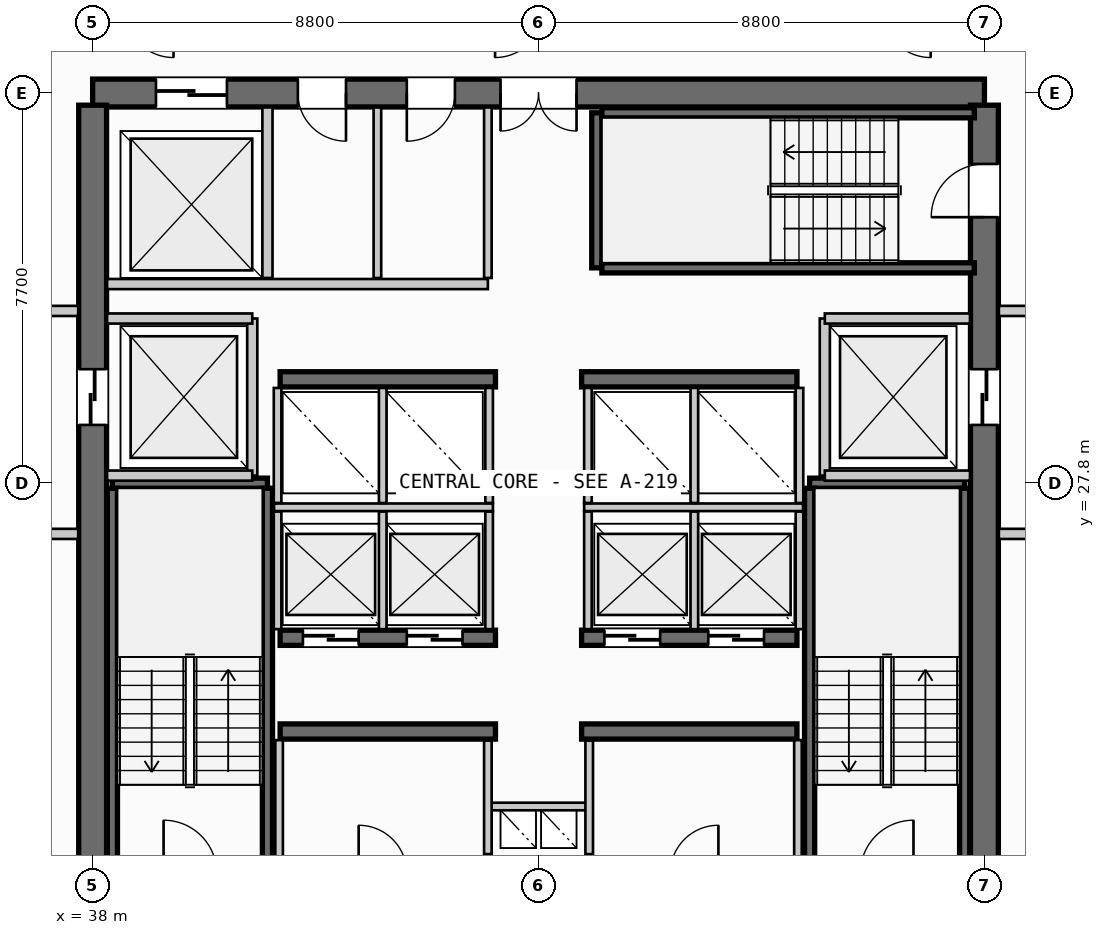
"""IFC4 building model, lengths in metres.
Left out: names, types, materials, properties, quantities, classifications, styles, units other than length and angle.
Written with IfcOpenShell. Run it as: python <this file> out.ifc"""

import sys

from ifc_helpers import new_model, si_unit, direction, frame, frame_2d, origin, place, context, subcontext, project, spatial, rectangle, extrude, source, transform, mapped, element, fill, save


model = new_model("IFC4")
c1 = context("Model", 3, precision=1e-05, world=origin(), true_north=direction((0.0, 1.0)))
c2 = subcontext(c1, "Body", "Model", "MODEL_VIEW")
j1 = project(units=[si_unit("LENGTHUNIT", "METRE"), si_unit("PLANEANGLEUNIT", "RADIAN")], contexts=[c1])
p1 = place(None, origin())
s1 = spatial("IfcSite", under=j1, at=p1, CompositionType="ELEMENT")
p2 = place(p1, origin())
s2 = spatial("IfcBuilding", under=s1, at=p2, CompositionType="ELEMENT")
p3 = place(p2, frame((0.0, 0.0, 135.9)))
s3 = spatial("IfcBuildingStorey", under=s2, at=p3, CompositionType="ELEMENT", Elevation=135.9)
p4 = place(p3, frame((55.6, 35.5, 0.0), z_axis=(0.0, 0.0, 1.0), x_axis=(-1.0, 0.0, 0.0)))
e1 = element("IfcWall", 1, at=p4, inside=s3, PredefinedType="SHEAR", context=c2, shape_type="SweptSolid", body=[
    extrude(rectangle(XDim=17.6, YDim=0.55, at=frame_2d((8.8, 0.0))), origin(), (0.0, 0.0, 1.0), 3.3),
])
p5 = place(p4, frame((8.05, 0.0, 0.0)))
e2 = element("IfcOpeningElement", 2, at=p5, cuts=e1, PredefinedType="OPENING", context=c2, shape_type="SweptSolid", body=[
    extrude(rectangle(XDim=1.5, YDim=2.2, at=frame_2d((0.75, 1.1))), frame((0.0, 0.285, 0.0), z_axis=(0.0, -1.0, 0.0), x_axis=(1.0, 0.0, 0.0)), (0.0, 0.0, 1.0), 0.57),
])
p6 = place(p4, frame((14.95, 0.0, 0.0)))
e3 = element("IfcOpeningElement", 3, at=p6, cuts=e1, PredefinedType="OPENING", context=c2, shape_type="SweptSolid", body=[
    extrude(rectangle(XDim=1.4, YDim=2.3, at=frame_2d((0.7, 1.15))), frame((0.0, 0.285, 0.0), z_axis=(0.0, -1.0, 0.0), x_axis=(1.0, 0.0, 0.0)), (0.0, 0.0, 1.0), 0.57),
])
p7 = place(p4, frame((12.6, 0.0, 0.0)))
e4 = element("IfcOpeningElement", 4, at=p7, cuts=e1, PredefinedType="OPENING", context=c2, shape_type="SweptSolid", body=[
    extrude(rectangle(XDim=0.95, YDim=2.15, at=frame_2d((0.475, 1.075))), frame((0.0, 0.285, 0.0), z_axis=(0.0, -1.0, 0.0), x_axis=(1.0, 0.0, 0.0)), (0.0, 0.0, 1.0), 0.57),
])
p8 = place(p4, frame((10.45, 0.0, 0.0)))
e5 = element("IfcOpeningElement", 5, at=p8, cuts=e1, PredefinedType="OPENING", context=c2, shape_type="SweptSolid", body=[
    extrude(rectangle(XDim=0.95, YDim=2.15, at=frame_2d((0.475, 1.075))), frame((0.0, 0.285, 0.0), z_axis=(0.0, -1.0, 0.0), x_axis=(1.0, 0.0, 0.0)), (0.0, 0.0, 1.0), 0.57),
])
p9 = place(p3, frame((38.0, 35.26, 0.0), z_axis=(0.0, 0.0, 1.0), x_axis=(0.0, -1.0, 0.0)))
e6 = element("IfcWall", 6, at=p9, inside=s3, PredefinedType="SHEAR", context=c2, shape_type="SweptSolid", body=[
    extrude(rectangle(XDim=14.92, YDim=0.55, at=frame_2d((7.46, 0.0))), origin(), (0.0, 0.0, 1.0), 3.3),
])
p10 = place(p9, frame((5.21, 0.0, 0.0)))
e7 = element("IfcOpeningElement", 7, at=p10, cuts=e6, PredefinedType="OPENING", context=c2, shape_type="SweptSolid", body=[
    extrude(rectangle(XDim=1.1, YDim=2.2, at=frame_2d((0.55, 1.1))), frame((0.0, 0.285, 0.0), z_axis=(0.0, -1.0, 0.0), x_axis=(1.0, 0.0, 0.0)), (0.0, 0.0, 1.0), 0.57),
])
p11 = place(p3, frame((55.6, 20.34, 0.0), z_axis=(0.0, 0.0, 1.0), x_axis=(0.0, 1.0, 0.0)))
e8 = element("IfcWall", 8, at=p11, inside=s3, PredefinedType="SHEAR", context=c2, shape_type="SweptSolid", body=[
    extrude(rectangle(XDim=14.92, YDim=0.55, at=frame_2d((7.46, 0.0))), origin(), (0.0, 0.0, 1.0), 3.3),
])
p12 = place(p11, frame((12.71, 0.0, 0.0)))
e9 = element("IfcOpeningElement", 9, at=p12, cuts=e8, PredefinedType="OPENING", context=c2, shape_type="SweptSolid", body=[
    extrude(rectangle(XDim=1.05, YDim=2.15, at=frame_2d((0.525, 1.075))), frame((0.0, 0.285, 0.0), z_axis=(0.0, -1.0, 0.0), x_axis=(1.0, 0.0, 0.0)), (0.0, 0.0, 1.0), 0.57),
])
p13 = place(p11, frame((8.61, 0.0, 0.0)))
e10 = element("IfcOpeningElement", 10, at=p13, cuts=e8, PredefinedType="OPENING", context=c2, shape_type="SweptSolid", body=[
    extrude(rectangle(XDim=1.1, YDim=2.2, at=frame_2d((0.55, 1.1))), frame((0.0, 0.285, 0.0), z_axis=(0.0, -1.0, 0.0), x_axis=(1.0, 0.0, 0.0)), (0.0, 0.0, 1.0), 0.57),
])
for number, where, z_axis, x_axis in (
    (11, (41.7, 22.9, 0.0), (0.0, 0.0, 1.0), (1.0, 0.0, 0.0)),
    (12, (47.65, 22.9, 0.0), (0.0, 0.0, 1.0), (1.0, 0.0, 0.0)),
):
    element("IfcWall", number, at=place(p3, frame(where, z_axis=z_axis, x_axis=x_axis)), inside=s3, PredefinedType="SHEAR", context=c2, shape_type="SweptSolid", body=[
        extrude(rectangle(XDim=4.25, YDim=0.3, at=frame_2d((2.125, 0.0))), origin(), (0.0, 0.0, 1.0), 3.3),
    ])
p14 = place(p3, frame((41.7, 24.75, 0.0), z_axis=(0.0, 0.0, 1.0), x_axis=(1.0, 0.0, 0.0)))
e13 = element("IfcWall", 13, at=p14, inside=s3, PredefinedType="SHEAR", context=c2, shape_type="SweptSolid", body=[
    extrude(rectangle(XDim=4.25, YDim=0.3, at=frame_2d((2.125, 0.0))), origin(), (0.0, 0.0, 1.0), 3.3),
])
p15 = place(p14, frame((0.45, 0.0, 0.0)))
e14 = element("IfcOpeningElement", 14, at=p15, cuts=e13, PredefinedType="OPENING", context=c2, shape_type="SweptSolid", body=[
    extrude(rectangle(XDim=1.1, YDim=2.2, at=frame_2d((0.55, 1.1))), frame((0.0, 0.16, 0.0), z_axis=(0.0, -1.0, 0.0), x_axis=(1.0, 0.0, 0.0)), (0.0, 0.0, 1.0), 0.32),
])
p16 = place(p14, frame((2.5, 0.0, 0.0)))
e15 = element("IfcOpeningElement", 15, at=p16, cuts=e13, PredefinedType="OPENING", context=c2, shape_type="SweptSolid", body=[
    extrude(rectangle(XDim=1.1, YDim=2.2, at=frame_2d((0.55, 1.1))), frame((0.0, 0.16, 0.0), z_axis=(0.0, -1.0, 0.0), x_axis=(1.0, 0.0, 0.0)), (0.0, 0.0, 1.0), 0.32),
])
p17 = place(p3, frame((47.65, 24.75, 0.0), z_axis=(0.0, 0.0, 1.0), x_axis=(1.0, 0.0, 0.0)))
e16 = element("IfcWall", 16, at=p17, inside=s3, PredefinedType="SHEAR", context=c2, shape_type="SweptSolid", body=[
    extrude(rectangle(XDim=4.25, YDim=0.3, at=frame_2d((2.125, 0.0))), origin(), (0.0, 0.0, 1.0), 3.3),
])
p18 = place(p17, frame((0.45, 0.0, 0.0)))
e17 = element("IfcOpeningElement", 17, at=p18, cuts=e16, PredefinedType="OPENING", context=c2, shape_type="SweptSolid", body=[
    extrude(rectangle(XDim=1.1, YDim=2.2, at=frame_2d((0.55, 1.1))), frame((0.0, 0.16, 0.0), z_axis=(0.0, -1.0, 0.0), x_axis=(1.0, 0.0, 0.0)), (0.0, 0.0, 1.0), 0.32),
])
p19 = place(p17, frame((2.5, 0.0, 0.0)))
e18 = element("IfcOpeningElement", 18, at=p19, cuts=e16, PredefinedType="OPENING", context=c2, shape_type="SweptSolid", body=[
    extrude(rectangle(XDim=1.1, YDim=2.2, at=frame_2d((0.55, 1.1))), frame((0.0, 0.16, 0.0), z_axis=(0.0, -1.0, 0.0), x_axis=(1.0, 0.0, 0.0)), (0.0, 0.0, 1.0), 0.32),
])
for number, where, z_axis, x_axis in (
    (19, (41.7, 29.85, 0.0), (0.0, 0.0, 1.0), (1.0, 0.0, 0.0)),
    (20, (47.65, 29.85, 0.0), (0.0, 0.0, 1.0), (1.0, 0.0, 0.0)),
):
    element("IfcWall", number, at=place(p3, frame(where, z_axis=z_axis, x_axis=x_axis)), inside=s3, PredefinedType="SHEAR", context=c2, shape_type="SweptSolid", body=[
        extrude(rectangle(XDim=4.25, YDim=0.3, at=frame_2d((2.125, 0.0))), origin(), (0.0, 0.0, 1.0), 3.3),
    ])
p20 = place(p3, frame((38.39, 27.8, 0.0), z_axis=(0.0, 0.0, 1.0), x_axis=(1.0, 0.0, 0.0)))
e21 = element("IfcWall", 21, at=p20, inside=s3, PredefinedType="SHEAR", context=c2, shape_type="SweptSolid", body=[
    extrude(rectangle(XDim=3.06, YDim=0.2, at=frame_2d((1.53, 0.0))), origin(), (0.0, 0.0, 1.0), 3.3),
])
for number, where, z_axis, x_axis in (
    (22, (41.45, 27.7, 0.0), (0.0, 0.0, 1.0), (0.0, -1.0, 0.0)),
    (23, (38.39, 20.35, 0.0), (0.0, 0.0, 1.0), (0.0, 1.0, 0.0)),
):
    element("IfcWall", number, at=place(p3, frame(where, z_axis=z_axis, x_axis=x_axis)), inside=s3, PredefinedType="SHEAR", context=c2, shape_type="SweptSolid", body=[
        extrude(rectangle(XDim=7.35, YDim=0.2, at=frame_2d((3.675, 0.0))), origin(), (0.0, 0.0, 1.0), 3.3),
    ])
p21 = place(p3, frame((52.15, 27.8, 0.0), z_axis=(0.0, 0.0, 1.0), x_axis=(1.0, 0.0, 0.0)))
e24 = element("IfcWall", 24, at=p21, inside=s3, PredefinedType="SHEAR", context=c2, shape_type="SweptSolid", body=[
    extrude(rectangle(XDim=3.06, YDim=0.2, at=frame_2d((1.53, 0.0))), origin(), (0.0, 0.0, 1.0), 3.3),
])
for number, where, z_axis, x_axis in (
    (25, (55.21, 27.7, 0.0), (0.0, 0.0, 1.0), (0.0, -1.0, 0.0)),
    (26, (52.15, 20.35, 0.0), (0.0, 0.0, 1.0), (0.0, 1.0, 0.0)),
):
    element("IfcWall", number, at=place(p3, frame(where, z_axis=z_axis, x_axis=x_axis)), inside=s3, PredefinedType="SHEAR", context=c2, shape_type="SweptSolid", body=[
        extrude(rectangle(XDim=7.35, YDim=0.2, at=frame_2d((3.675, 0.0))), origin(), (0.0, 0.0, 1.0), 3.3),
    ])
p22 = place(p3, frame((47.95, 32.05, 0.0), z_axis=(0.0, 0.0, 1.0), x_axis=(0.0, 1.0, 0.0)))
e27 = element("IfcWall", 27, at=p22, inside=s3, PredefinedType="SHEAR", context=c2, shape_type="SweptSolid", body=[
    extrude(rectangle(XDim=3.06, YDim=0.2, at=frame_2d((1.53, 0.0))), origin(), (0.0, 0.0, 1.0), 3.3),
])
for number, where, z_axis, x_axis in (
    (28, (48.05, 35.11, 0.0), (0.0, 0.0, 1.0), (1.0, 0.0, 0.0)),
    (29, (55.4, 32.05, 0.0), (0.0, 0.0, 1.0), (-1.0, 0.0, 0.0)),
):
    element("IfcWall", number, at=place(p3, frame(where, z_axis=z_axis, x_axis=x_axis)), inside=s3, PredefinedType="SHEAR", context=c2, shape_type="SweptSolid", body=[
        extrude(rectangle(XDim=7.35, YDim=0.2, at=frame_2d((3.675, 0.0))), origin(), (0.0, 0.0, 1.0), 3.3),
    ])
p23 = place(p3, frame((45.8, 21.42, 0.0), z_axis=(0.0, 0.0, 1.0), x_axis=(1.0, 0.0, 0.0)))
e30 = element("IfcWall", 30, at=p23, inside=s3, PredefinedType="PARTITIONING", context=c2, shape_type="SweptSolid", body=[
    extrude(rectangle(XDim=2.0, YDim=0.15, at=frame_2d((1.0, 0.0))), origin(), (0.0, 0.0, 1.0), 2.445),
])
for number, where, z_axis, x_axis in (
    (31, (45.8, 20.48, 0.0), (0.0, 0.0, 1.0), (0.0, 1.0, 0.0)),
    (32, (47.8, 20.48, 0.0), (0.0, 0.0, 1.0), (0.0, 1.0, 0.0)),
):
    element("IfcWall", number, at=place(p3, frame(where, z_axis=z_axis, x_axis=x_axis)), inside=s3, PredefinedType="PARTITIONING", context=c2, shape_type="SweptSolid", body=[
        extrude(rectangle(XDim=2.24, YDim=0.15, at=frame_2d((1.12, 0.0))), origin(), (0.0, 0.0, 1.0), 2.445),
    ])
p24 = place(p3, frame((41.15, 27.95, 0.0), z_axis=(0.0, 0.0, 1.0), x_axis=(0.0, 1.0, 0.0)))
e33 = element("IfcWall", 33, at=p24, inside=s3, PredefinedType="PARTITIONING", context=c2, shape_type="SweptSolid", body=[
    extrude(rectangle(XDim=3.1, YDim=0.2, at=frame_2d((1.55, 0.0))), origin(), (0.0, 0.0, 1.0), 2.445),
])
for number, where, z_axis, x_axis in (
    (34, (38.285, 27.95, 0.0), (0.0, 0.0, 1.0), (1.0, 0.0, 0.0)),
    (35, (38.285, 31.05, 0.0), (0.0, 0.0, 1.0), (1.0, 0.0, 0.0)),
):
    element("IfcWall", number, at=place(p3, frame(where, z_axis=z_axis, x_axis=x_axis)), inside=s3, PredefinedType="PARTITIONING", context=c2, shape_type="SweptSolid", body=[
        extrude(rectangle(XDim=2.865, YDim=0.2, at=frame_2d((1.433, 0.0))), origin(), (0.0, 0.0, 1.0), 2.445),
    ])
for number, where, z_axis, x_axis in (
    (36, (34.5, 26.8, 0.0), (0.0, 0.0, 1.0), (1.0, 0.0, 0.0)),
    (37, (34.5, 31.2, 0.0), (0.0, 0.0, 1.0), (1.0, 0.0, 0.0)),
):
    element("IfcWall", number, at=place(p3, frame(where, z_axis=z_axis, x_axis=x_axis)), inside=s3, PredefinedType="PARTITIONING", context=c2, shape_type="SweptSolid", body=[
        extrude(rectangle(XDim=3.215, YDim=0.2, at=frame_2d((1.607, 0.0))), origin(), (0.0, 0.0, 1.0), 2.445),
    ])
p25 = place(p3, frame((52.45, 27.95, 0.0), z_axis=(0.0, 0.0, 1.0), x_axis=(0.0, 1.0, 0.0)))
e38 = element("IfcWall", 38, at=p25, inside=s3, PredefinedType="PARTITIONING", context=c2, shape_type="SweptSolid", body=[
    extrude(rectangle(XDim=3.1, YDim=0.2, at=frame_2d((1.55, 0.0))), origin(), (0.0, 0.0, 1.0), 2.445),
])
for number, where, z_axis, x_axis in (
    (39, (52.45, 27.95, 0.0), (0.0, 0.0, 1.0), (1.0, 0.0, 0.0)),
    (40, (52.45, 31.05, 0.0), (0.0, 0.0, 1.0), (1.0, 0.0, 0.0)),
):
    element("IfcWall", number, at=place(p3, frame(where, z_axis=z_axis, x_axis=x_axis)), inside=s3, PredefinedType="PARTITIONING", context=c2, shape_type="SweptSolid", body=[
        extrude(rectangle(XDim=2.865, YDim=0.2, at=frame_2d((1.433, 0.0))), origin(), (0.0, 0.0, 1.0), 2.445),
    ])
for number, where, z_axis, x_axis in (
    (41, (55.885, 26.8, 0.0), (0.0, 0.0, 1.0), (1.0, 0.0, 0.0)),
    (42, (55.885, 31.2, 0.0), (0.0, 0.0, 1.0), (1.0, 0.0, 0.0)),
):
    element("IfcWall", number, at=place(p3, frame(where, z_axis=z_axis, x_axis=x_axis)), inside=s3, PredefinedType="PARTITIONING", context=c2, shape_type="SweptSolid", body=[
        extrude(rectangle(XDim=3.215, YDim=0.2, at=frame_2d((1.607, 0.0))), origin(), (0.0, 0.0, 1.0), 2.445),
    ])
for number, where, z_axis, x_axis in (
    (43, (41.68, 20.385, 0.0), (0.0, 0.0, 1.0), (0.0, 1.0, 0.0)),
    (44, (51.92, 20.385, 0.0), (0.0, 0.0, 1.0), (0.0, 1.0, 0.0)),
):
    element("IfcWall", number, at=place(p3, frame(where, z_axis=z_axis, x_axis=x_axis)), inside=s3, PredefinedType="PARTITIONING", context=c2, shape_type="SweptSolid", body=[
        extrude(rectangle(XDim=2.345, YDim=0.15, at=frame_2d((1.172, 0.0))), origin(), (0.0, 0.0, 1.0), 2.445),
    ])
p26 = place(p3, frame((41.58, 27.325, 0.0), z_axis=(0.0, 0.0, 1.0), x_axis=(1.0, 0.0, 0.0)))
e45 = element("IfcWall", 45, at=p26, inside=s3, PredefinedType="PARTITIONING", context=c2, shape_type="SweptSolid", body=[
    extrude(rectangle(XDim=4.32, YDim=0.15, at=frame_2d((2.16, 0.0))), origin(), (0.0, 0.0, 1.0), 2.445),
])
p27 = place(p3, frame((47.7, 27.325, 0.0), z_axis=(0.0, 0.0, 1.0), x_axis=(1.0, 0.0, 0.0)))
e46 = element("IfcWall", 46, at=p27, inside=s3, PredefinedType="PARTITIONING", context=c2, shape_type="SweptSolid", body=[
    extrude(rectangle(XDim=4.32, YDim=0.15, at=frame_2d((2.16, 0.0))), origin(), (0.0, 0.0, 1.0), 2.445),
])
for number, where, z_axis, x_axis in (
    (47, (41.65, 24.92, 0.0), (0.0, 0.0, 1.0), (0.0, 1.0, 0.0)),
    (48, (43.725, 24.92, 0.0), (0.0, 0.0, 1.0), (0.0, 1.0, 0.0)),
    (49, (45.825, 24.92, 0.0), (0.0, 0.0, 1.0), (0.0, 1.0, 0.0)),
    (50, (47.775, 24.92, 0.0), (0.0, 0.0, 1.0), (0.0, 1.0, 0.0)),
    (51, (49.875, 24.92, 0.0), (0.0, 0.0, 1.0), (0.0, 1.0, 0.0)),
    (52, (51.95, 24.92, 0.0), (0.0, 0.0, 1.0), (0.0, 1.0, 0.0)),
):
    element("IfcWall", number, at=place(p3, frame(where, z_axis=z_axis, x_axis=x_axis)), inside=s3, PredefinedType="PARTITIONING", context=c2, shape_type="SweptSolid", body=[
        extrude(rectangle(XDim=2.32, YDim=0.15, at=frame_2d((1.16, 0.0))), origin(), (0.0, 0.0, 1.0), 2.445),
    ])
for number, where, z_axis, x_axis in (
    (53, (41.65, 27.41, 0.0), (0.0, 0.0, 1.0), (0.0, 1.0, 0.0)),
    (54, (43.725, 27.41, 0.0), (0.0, 0.0, 1.0), (0.0, 1.0, 0.0)),
    (55, (45.825, 27.41, 0.0), (0.0, 0.0, 1.0), (0.0, 1.0, 0.0)),
    (56, (47.775, 27.41, 0.0), (0.0, 0.0, 1.0), (0.0, 1.0, 0.0)),
    (57, (49.875, 27.41, 0.0), (0.0, 0.0, 1.0), (0.0, 1.0, 0.0)),
    (58, (51.95, 27.41, 0.0), (0.0, 0.0, 1.0), (0.0, 1.0, 0.0)),
):
    element("IfcWall", number, at=place(p3, frame(where, z_axis=z_axis, x_axis=x_axis)), inside=s3, PredefinedType="PARTITIONING", context=c2, shape_type="SweptSolid", body=[
        extrude(rectangle(XDim=2.27, YDim=0.15, at=frame_2d((1.135, 0.0))), origin(), (0.0, 0.0, 1.0), 2.445),
    ])
p28 = place(p3, frame((41.45, 31.85, 0.0), z_axis=(0.0, 0.0, 1.0), x_axis=(0.0, 1.0, 0.0)))
e59 = element("IfcWall", 59, at=p28, inside=s3, PredefinedType="PARTITIONING", context=c2, shape_type="SweptSolid", body=[
    extrude(rectangle(XDim=3.365, YDim=0.2, at=frame_2d((1.683, 0.0))), origin(), (0.0, 0.0, 1.0), 2.445),
])
p29 = place(p3, frame((38.285, 31.73, 0.0), z_axis=(0.0, 0.0, 1.0), x_axis=(1.0, 0.0, 0.0)))
e60 = element("IfcWall", 60, at=p29, inside=s3, PredefinedType="PARTITIONING", context=c2, shape_type="SweptSolid", body=[
    extrude(rectangle(XDim=7.515, YDim=0.2, at=frame_2d((3.758, 0.0))), origin(), (0.0, 0.0, 1.0), 2.445),
])
p30 = place(p3, frame((45.8, 31.85, 0.0), z_axis=(0.0, 0.0, 1.0), x_axis=(0.0, 1.0, 0.0)))
e61 = element("IfcWall", 61, at=p30, inside=s3, PredefinedType="PARTITIONING", context=c2, shape_type="SweptSolid", body=[
    extrude(rectangle(XDim=3.365, YDim=0.15, at=frame_2d((1.683, 0.0))), origin(), (0.0, 0.0, 1.0), 2.445),
])
p31 = place(p3, frame((43.62, 31.85, 0.0), z_axis=(0.0, 0.0, 1.0), x_axis=(0.0, 1.0, 0.0)))
e62 = element("IfcWall", 62, at=p31, inside=s3, PredefinedType="PLUMBINGWALL", context=c2, shape_type="SweptSolid", body=[
    extrude(rectangle(XDim=3.365, YDim=0.15, at=frame_2d((1.683, 0.0))), origin(), (0.0, 0.0, 1.0), 2.445),
])
m1 = source(origin(), c2, "Body", "SweptSolid", [
    extrude(rectangle(XDim=1.05, YDim=2.15, at=frame_2d((0.525, 1.075))), frame((0.0, 0.025, 0.0), z_axis=(0.0, -1.0, 0.0), x_axis=(1.0, 0.0, 0.0)), (0.0, 0.0, 1.0), 0.05),
])
p32 = place(p12, origin())
e63 = element("IfcDoor", 63, at=p32, inside=s3, OperationType="SINGLE_SWING_LEFT", PredefinedType="DOOR", context=c2, shape_type="MappedRepresentation", body=[
    mapped(m1, transform((0.0, 0.0, 0.0), scale=1.0)),
])
fill(e9, e63)
m2 = source(origin(), c2, "Body", "SweptSolid", [
    extrude(rectangle(XDim=1.5, YDim=2.2, at=frame_2d((0.75, 1.1))), frame((0.0, 0.025, 0.0), z_axis=(0.0, -1.0, 0.0), x_axis=(1.0, 0.0, 0.0)), (0.0, 0.0, 1.0), 0.05),
])
p33 = place(p5, origin())
e64 = element("IfcDoor", 64, at=p33, inside=s3, OperationType="DOUBLE_DOOR_SINGLE_SWING", PredefinedType="DOOR", context=c2, shape_type="MappedRepresentation", body=[
    mapped(m2, transform((0.0, 0.0, 0.0), scale=1.0)),
])
fill(e2, e64)
m3 = source(origin(), c2, "Body", "SweptSolid", [
    extrude(rectangle(XDim=1.1, YDim=2.2, at=frame_2d((0.55, 1.1))), frame((0.0, 0.025, 0.0), z_axis=(0.0, -1.0, 0.0), x_axis=(1.0, 0.0, 0.0)), (0.0, 0.0, 1.0), 0.05),
])
p34 = place(p10, origin())
e65 = element("IfcDoor", 65, at=p34, inside=s3, OperationType="SLIDING_TO_LEFT", PredefinedType="DOOR", context=c2, shape_type="MappedRepresentation", body=[
    mapped(m3, transform((0.0, 0.0, 0.0), scale=1.0)),
])
fill(e7, e65)
p35 = place(p13, origin())
e66 = element("IfcDoor", 66, at=p35, inside=s3, OperationType="SLIDING_TO_RIGHT", PredefinedType="DOOR", context=c2, shape_type="MappedRepresentation", body=[
    mapped(m3, transform((0.0, 0.0, 0.0), scale=1.0)),
])
fill(e10, e66)
p36 = place(p15, origin())
e67 = element("IfcDoor", 67, at=p36, inside=s3, OperationType="SLIDING_TO_RIGHT", PredefinedType="DOOR", context=c2, shape_type="MappedRepresentation", body=[
    mapped(m3, transform((0.0, 0.0, 0.0), scale=1.0)),
])
fill(e14, e67)
p37 = place(p16, origin())
e68 = element("IfcDoor", 68, at=p37, inside=s3, OperationType="SLIDING_TO_RIGHT", PredefinedType="DOOR", context=c2, shape_type="MappedRepresentation", body=[
    mapped(m3, transform((0.0, 0.0, 0.0), scale=1.0)),
])
fill(e15, e68)
p38 = place(p18, origin())
e69 = element("IfcDoor", 69, at=p38, inside=s3, OperationType="SLIDING_TO_RIGHT", PredefinedType="DOOR", context=c2, shape_type="MappedRepresentation", body=[
    mapped(m3, transform((0.0, 0.0, 0.0), scale=1.0)),
])
fill(e17, e69)
p39 = place(p19, origin())
e70 = element("IfcDoor", 70, at=p39, inside=s3, OperationType="SLIDING_TO_RIGHT", PredefinedType="DOOR", context=c2, shape_type="MappedRepresentation", body=[
    mapped(m3, transform((0.0, 0.0, 0.0), scale=1.0)),
])
fill(e18, e70)
m4 = source(origin(), c2, "Body", "SweptSolid", [
    extrude(rectangle(XDim=1.4, YDim=2.3, at=frame_2d((0.7, 1.15))), frame((0.0, 0.025, 0.0), z_axis=(0.0, -1.0, 0.0), x_axis=(1.0, 0.0, 0.0)), (0.0, 0.0, 1.0), 0.05),
])
p40 = place(p6, origin())
e71 = element("IfcDoor", 71, at=p40, inside=s3, OperationType="SLIDING_TO_RIGHT", PredefinedType="DOOR", context=c2, shape_type="MappedRepresentation", body=[
    mapped(m4, transform((0.0, 0.0, 0.0), scale=1.0)),
])
fill(e3, e71)
m5 = source(origin(), c2, "Body", "SweptSolid", [
    extrude(rectangle(XDim=0.95, YDim=2.15, at=frame_2d((0.475, 1.075))), frame((0.0, 0.025, 0.0), z_axis=(0.0, -1.0, 0.0), x_axis=(1.0, 0.0, 0.0)), (0.0, 0.0, 1.0), 0.05),
])
p41 = place(p7, origin())
e72 = element("IfcDoor", 72, at=p41, inside=s3, OperationType="SINGLE_SWING_LEFT", PredefinedType="DOOR", context=c2, shape_type="MappedRepresentation", body=[
    mapped(m5, transform((0.0, 0.0, 0.0), scale=1.0)),
])
fill(e4, e72)
p42 = place(p8, origin())
e73 = element("IfcDoor", 73, at=p42, inside=s3, OperationType="SINGLE_SWING_RIGHT", PredefinedType="DOOR", context=c2, shape_type="MappedRepresentation", body=[
    mapped(m5, transform((0.0, 0.0, 0.0), scale=1.0)),
])
fill(e5, e73)
save(model, sys.argv[1])
